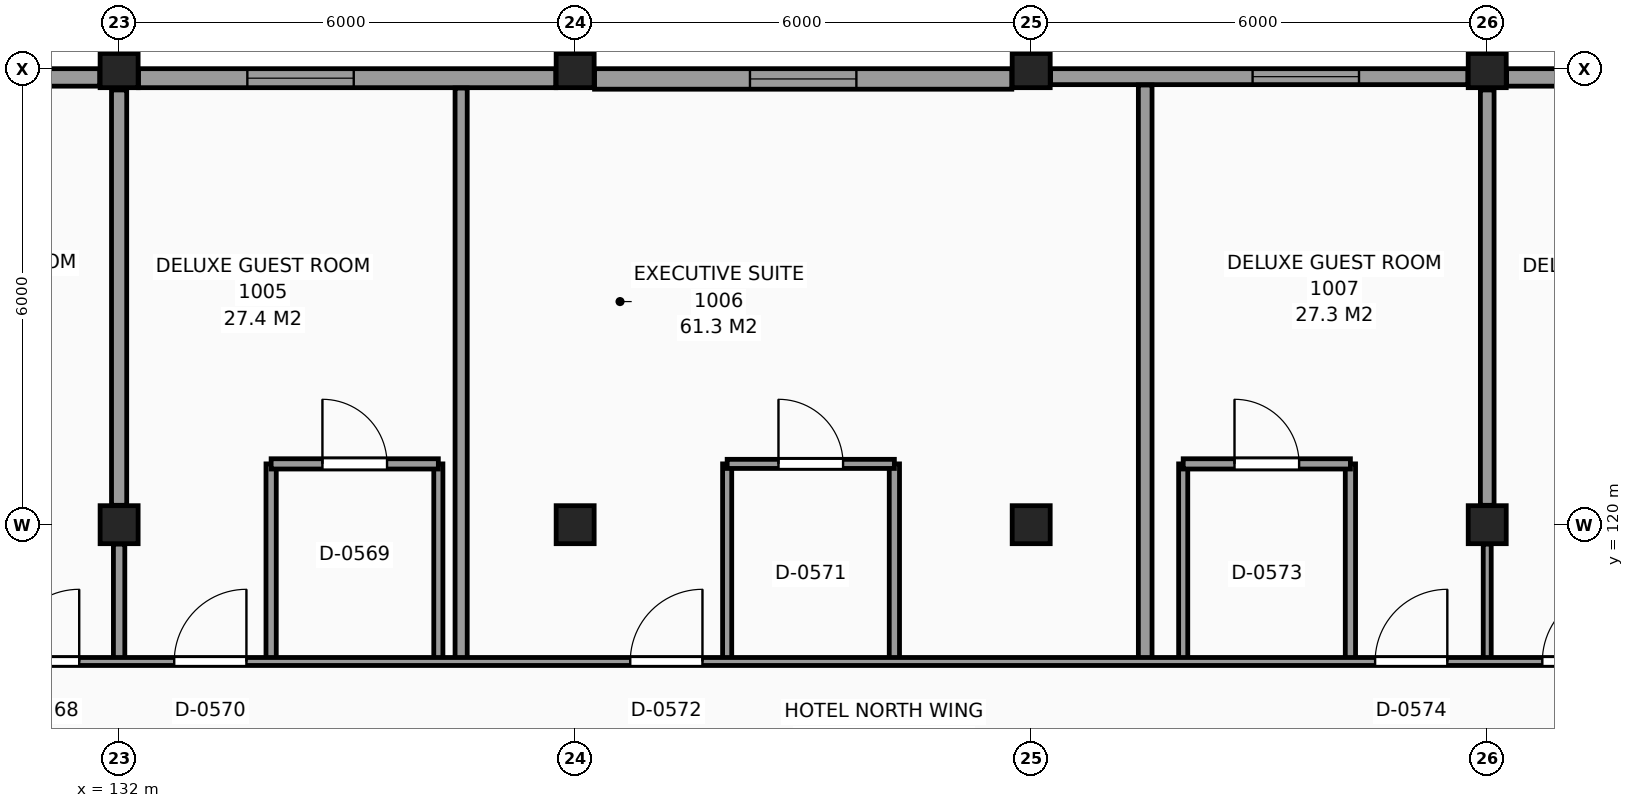
"""IFC4 building model, lengths in metres.
Left out: names, types, materials, properties, quantities, classifications, styles, units other than length and angle.
Written with IfcOpenShell. Run it as: python <this file> out.ifc"""

import sys

from ifc_helpers import new_model, si_unit, direction, frame, frame_2d, origin, origin_2d, place, context, subcontext, project, spatial, rectangle, extrude, element, fill, save


model = new_model("IFC4")
c1 = context("Model", 3, precision=1e-05, world=origin(), true_north=direction((0.0, 1.0)))
c2 = subcontext(c1, "Body", "Model", "MODEL_VIEW")
j1 = project(units=[si_unit("LENGTHUNIT", "METRE"), si_unit("PLANEANGLEUNIT", "RADIAN")], contexts=[c1])
p1 = place(None, origin())
s1 = spatial("IfcSite", under=j1, at=p1, CompositionType="ELEMENT")
p2 = place(p1, origin())
s2 = spatial("IfcBuilding", under=s1, at=p2, CompositionType="ELEMENT")
p3 = place(p2, frame((0.0, 0.0, 41.4)))
s3 = spatial("IfcBuildingStorey", under=s2, at=p3, CompositionType="ELEMENT", Elevation=41.4)
for number, where, z_axis, x_axis in (
    (1, (132.0, 120.0, 0.0), (0.0, 0.0, 1.0), (1.0, 0.0, 0.0)),
    (2, (132.0, 126.0, 0.0), (0.0, 0.0, 1.0), (1.0, 0.0, 0.0)),
    (3, (138.0, 120.0, 0.0), (0.0, 0.0, 1.0), (1.0, 0.0, 0.0)),
    (4, (138.0, 126.0, 0.0), (0.0, 0.0, 1.0), (1.0, 0.0, 0.0)),
    (5, (144.0, 120.0, 0.0), (0.0, 0.0, 1.0), (1.0, 0.0, 0.0)),
    (6, (144.0, 126.0, 0.0), (0.0, 0.0, 1.0), (1.0, 0.0, 0.0)),
    (7, (150.0, 120.0, 0.0), (0.0, 0.0, 1.0), (1.0, 0.0, 0.0)),
    (8, (150.0, 126.0, 0.0), (0.0, 0.0, 1.0), (1.0, 0.0, 0.0)),
):
    element("IfcColumn", number, at=place(p3, frame(where, z_axis=z_axis, x_axis=x_axis)), inside=s3, PredefinedType="COLUMN", context=c2, shape_type="SweptSolid", body=[
        extrude(rectangle(XDim=0.5, YDim=0.5, at=origin_2d()), origin(), (0.0, 0.0, 1.0), 3.3),
    ])
p4 = place(p3, frame((155.745, 125.885, 0.0), z_axis=(0.0, 0.0, 1.0), x_axis=(-1.0, 0.0, 0.0)))
e9 = element("IfcWall", 9, at=p4, inside=s3, PredefinedType="SOLIDWALL", context=c2, shape_type="SweptSolid", body=[
    extrude(rectangle(XDim=5.49, YDim=0.23, at=frame_2d((2.745, 0.0))), origin(), (0.0, 0.0, 1.0), 2.41),
])
p5 = place(p4, frame((2.658, 0.0, 0.8)))
e10 = element("IfcOpeningElement", 10, at=p5, cuts=e9, PredefinedType="OPENING", context=c2, shape_type="SweptSolid", body=[
    extrude(rectangle(XDim=1.4, YDim=1.4, at=frame_2d((0.7, 0.7))), frame((0.0, 0.125, 0.0), z_axis=(0.0, -1.0, 0.0), x_axis=(1.0, 0.0, 0.0)), (0.0, 0.0, 1.0), 0.25),
])
p6 = place(p3, frame((149.745, 125.895, 0.0), z_axis=(0.0, 0.0, 1.0), x_axis=(-1.0, 0.0, 0.0)))
e11 = element("IfcWall", 11, at=p6, inside=s3, PredefinedType="SOLIDWALL", context=c2, shape_type="SweptSolid", body=[
    extrude(rectangle(XDim=5.49, YDim=0.21, at=frame_2d((2.745, 0.0))), origin(), (0.0, 0.0, 1.0), 2.41),
])
p7 = place(p6, frame((1.432, 0.0, 0.8)))
e12 = element("IfcOpeningElement", 12, at=p7, cuts=e11, PredefinedType="OPENING", context=c2, shape_type="SweptSolid", body=[
    extrude(rectangle(XDim=1.4, YDim=1.4, at=frame_2d((0.7, 0.7))), frame((0.0, 0.115, 0.0), z_axis=(0.0, -1.0, 0.0), x_axis=(1.0, 0.0, 0.0)), (0.0, 0.0, 1.0), 0.23),
])
p8 = place(p3, frame((143.745, 125.865, 0.0), z_axis=(0.0, 0.0, 1.0), x_axis=(-1.0, 0.0, 0.0)))
e13 = element("IfcWall", 13, at=p8, inside=s3, PredefinedType="SOLIDWALL", context=c2, shape_type="SweptSolid", body=[
    extrude(rectangle(XDim=5.49, YDim=0.27, at=frame_2d((2.745, 0.0))), origin(), (0.0, 0.0, 1.0), 2.41),
])
p9 = place(p8, frame((2.045, 0.0, 0.8)))
e14 = element("IfcOpeningElement", 14, at=p9, cuts=e13, PredefinedType="OPENING", context=c2, shape_type="SweptSolid", body=[
    extrude(rectangle(XDim=1.4, YDim=1.4, at=frame_2d((0.7, 0.7))), frame((0.0, 0.145, 0.0), z_axis=(0.0, -1.0, 0.0), x_axis=(1.0, 0.0, 0.0)), (0.0, 0.0, 1.0), 0.29),
])
p10 = place(p3, frame((137.745, 125.875, 0.0), z_axis=(0.0, 0.0, 1.0), x_axis=(-1.0, 0.0, 0.0)))
e15 = element("IfcWall", 15, at=p10, inside=s3, PredefinedType="SOLIDWALL", context=c2, shape_type="SweptSolid", body=[
    extrude(rectangle(XDim=5.49, YDim=0.25, at=frame_2d((2.745, 0.0))), origin(), (0.0, 0.0, 1.0), 2.41),
])
p11 = place(p10, frame((2.658, 0.0, 0.8)))
e16 = element("IfcOpeningElement", 16, at=p11, cuts=e15, PredefinedType="OPENING", context=c2, shape_type="SweptSolid", body=[
    extrude(rectangle(XDim=1.4, YDim=1.4, at=frame_2d((0.7, 0.7))), frame((0.0, 0.135, 0.0), z_axis=(0.0, -1.0, 0.0), x_axis=(1.0, 0.0, 0.0)), (0.0, 0.0, 1.0), 0.27),
])
p12 = place(p3, frame((131.745, 125.885, 0.0), z_axis=(0.0, 0.0, 1.0), x_axis=(-1.0, 0.0, 0.0)))
e17 = element("IfcWall", 17, at=p12, inside=s3, PredefinedType="SOLIDWALL", context=c2, shape_type="SweptSolid", body=[
    extrude(rectangle(XDim=5.49, YDim=0.23, at=frame_2d((2.745, 0.0))), origin(), (0.0, 0.0, 1.0), 2.41),
])
p13 = place(p12, frame((1.432, 0.0, 0.8)))
e18 = element("IfcOpeningElement", 18, at=p13, cuts=e17, PredefinedType="OPENING", context=c2, shape_type="SweptSolid", body=[
    extrude(rectangle(XDim=1.4, YDim=1.4, at=frame_2d((0.7, 0.7))), frame((0.0, 0.125, 0.0), z_axis=(0.0, -1.0, 0.0), x_axis=(1.0, 0.0, 0.0)), (0.0, 0.0, 1.0), 0.25),
])
p14 = place(p3, frame((132.0, 118.2, 0.0), z_axis=(0.0, 0.0, 1.0), x_axis=(0.0, 1.0, 0.0)))
e19 = element("IfcWall", 19, at=p14, inside=s3, PredefinedType="PARTITIONING", context=c2, shape_type="SweptSolid", body=[
    extrude(rectangle(XDim=1.545, YDim=0.15, at=frame_2d((0.772, 0.0))), origin(), (0.0, 0.0, 1.0), 2.26),
])
p15 = place(p3, frame((132.0, 120.255, 0.0), z_axis=(0.0, 0.0, 1.0), x_axis=(0.0, 1.0, 0.0)))
e20 = element("IfcWall", 20, at=p15, inside=s3, PredefinedType="PARTITIONING", context=c2, shape_type="SweptSolid", body=[
    extrude(rectangle(XDim=5.465, YDim=0.2, at=frame_2d((2.732, 0.0))), origin(), (0.0, 0.0, 1.0), 2.26),
])
p16 = place(p3, frame((134.0, 118.2, 0.0), z_axis=(0.0, 0.0, 1.0), x_axis=(0.0, 1.0, 0.0)))
e21 = element("IfcWall", 21, at=p16, inside=s3, PredefinedType="PARTITIONING", context=c2, shape_type="SweptSolid", body=[
    extrude(rectangle(XDim=2.6, YDim=0.135, at=frame_2d((1.3, 0.0))), origin(), (0.0, 0.0, 1.0), 3.06),
])
p17 = place(p3, frame((136.2, 118.2, 0.0), z_axis=(0.0, 0.0, 1.0), x_axis=(0.0, 1.0, 0.0)))
e22 = element("IfcWall", 22, at=p17, inside=s3, PredefinedType="PARTITIONING", context=c2, shape_type="SweptSolid", body=[
    extrude(rectangle(XDim=2.6, YDim=0.12, at=frame_2d((1.3, 0.0))), origin(), (0.0, 0.0, 1.0), 3.06),
])
p18 = place(p3, frame((136.5, 118.2, 0.0), z_axis=(0.0, 0.0, 1.0), x_axis=(0.0, 1.0, 0.0)))
e23 = element("IfcWall", 23, at=p18, inside=s3, PredefinedType="PARTITIONING", context=c2, shape_type="SweptSolid", body=[
    extrude(rectangle(XDim=7.545, YDim=0.16, at=frame_2d((3.772, 0.0))), origin(), (0.0, 0.0, 1.0), 3.06),
])
p19 = place(p3, frame((140.0, 118.2, 0.0), z_axis=(0.0, 0.0, 1.0), x_axis=(0.0, 1.0, 0.0)))
e24 = element("IfcWall", 24, at=p19, inside=s3, PredefinedType="PARTITIONING", context=c2, shape_type="SweptSolid", body=[
    extrude(rectangle(XDim=2.6, YDim=0.12, at=frame_2d((1.3, 0.0))), origin(), (0.0, 0.0, 1.0), 3.06),
])
p20 = place(p3, frame((142.2, 118.2, 0.0), z_axis=(0.0, 0.0, 1.0), x_axis=(0.0, 1.0, 0.0)))
e25 = element("IfcWall", 25, at=p20, inside=s3, PredefinedType="PARTITIONING", context=c2, shape_type="SweptSolid", body=[
    extrude(rectangle(XDim=2.6, YDim=0.135, at=frame_2d((1.3, 0.0))), origin(), (0.0, 0.0, 1.0), 3.06),
])
p21 = place(p3, frame((145.5, 118.2, 0.0), z_axis=(0.0, 0.0, 1.0), x_axis=(0.0, 1.0, 0.0)))
e26 = element("IfcWall", 26, at=p21, inside=s3, PredefinedType="PARTITIONING", context=c2, shape_type="SweptSolid", body=[
    extrude(rectangle(XDim=7.585, YDim=0.18, at=frame_2d((3.792, 0.0))), origin(), (0.0, 0.0, 1.0), 3.06),
])
p22 = place(p3, frame((146.0, 118.2, 0.0), z_axis=(0.0, 0.0, 1.0), x_axis=(0.0, 1.0, 0.0)))
e27 = element("IfcWall", 27, at=p22, inside=s3, PredefinedType="PARTITIONING", context=c2, shape_type="SweptSolid", body=[
    extrude(rectangle(XDim=2.6, YDim=0.12, at=frame_2d((1.3, 0.0))), origin(), (0.0, 0.0, 1.0), 3.06),
])
p23 = place(p3, frame((148.2, 118.2, 0.0), z_axis=(0.0, 0.0, 1.0), x_axis=(0.0, 1.0, 0.0)))
e28 = element("IfcWall", 28, at=p23, inside=s3, PredefinedType="PARTITIONING", context=c2, shape_type="SweptSolid", body=[
    extrude(rectangle(XDim=2.6, YDim=0.135, at=frame_2d((1.3, 0.0))), origin(), (0.0, 0.0, 1.0), 3.06),
])
p24 = place(p3, frame((150.0, 118.2, 0.0), z_axis=(0.0, 0.0, 1.0), x_axis=(0.0, 1.0, 0.0)))
e29 = element("IfcWall", 29, at=p24, inside=s3, PredefinedType="PARTITIONING", context=c2, shape_type="SweptSolid", body=[
    extrude(rectangle(XDim=1.545, YDim=0.105, at=frame_2d((0.772, 0.0))), origin(), (0.0, 0.0, 1.0), 2.26),
])
p25 = place(p3, frame((150.0, 120.255, 0.0), z_axis=(0.0, 0.0, 1.0), x_axis=(0.0, 1.0, 0.0)))
e30 = element("IfcWall", 30, at=p25, inside=s3, PredefinedType="PARTITIONING", context=c2, shape_type="SweptSolid", body=[
    extrude(rectangle(XDim=5.465, YDim=0.18, at=frame_2d((2.732, 0.0))), origin(), (0.0, 0.0, 1.0), 2.36),
])
p26 = place(p3, frame((102.275, 118.2, 0.0), z_axis=(0.0, 0.0, 1.0), x_axis=(1.0, 0.0, 0.0)))
e31 = element("IfcWall", 31, at=p26, inside=s3, PredefinedType="PARTITIONING", context=c2, shape_type="SweptSolid", body=[
    extrude(rectangle(XDim=74.225, YDim=0.105, at=frame_2d((37.113, 0.0))), origin(), (0.0, 0.0, 1.0), 3.06),
])
p27 = place(p26, frame((7.55, 0.0, 0.0)))
e32 = element("IfcOpeningElement", 32, at=p27, cuts=e31, PredefinedType="OPENING", context=c2, shape_type="SweptSolid", body=[
    extrude(rectangle(XDim=0.95, YDim=2.1, at=frame_2d((0.475, 1.05))), frame((0.0, 0.062, 0.0), z_axis=(0.0, -1.0, 0.0), x_axis=(1.0, 0.0, 0.0)), (0.0, 0.0, 1.0), 0.125),
])
p28 = place(p26, frame((9.35, 0.0, 0.0)))
e33 = element("IfcOpeningElement", 33, at=p28, cuts=e31, PredefinedType="OPENING", context=c2, shape_type="SweptSolid", body=[
    extrude(rectangle(XDim=0.95, YDim=2.1, at=frame_2d((0.475, 1.05))), frame((0.0, 0.062, 0.0), z_axis=(0.0, -1.0, 0.0), x_axis=(1.0, 0.0, 0.0)), (0.0, 0.0, 1.0), 0.125),
])
p29 = place(p26, frame((24.05, 0.0, 0.0)))
e34 = element("IfcOpeningElement", 34, at=p29, cuts=e31, PredefinedType="OPENING", context=c2, shape_type="SweptSolid", body=[
    extrude(rectangle(XDim=0.95, YDim=2.1, at=frame_2d((0.475, 1.05))), frame((0.0, 0.062, 0.0), z_axis=(0.0, -1.0, 0.0), x_axis=(1.0, 0.0, 0.0)), (0.0, 0.0, 1.0), 0.125),
])
p30 = place(p26, frame((28.25, 0.0, 0.0)))
e35 = element("IfcOpeningElement", 35, at=p30, cuts=e31, PredefinedType="OPENING", context=c2, shape_type="SweptSolid", body=[
    extrude(rectangle(XDim=0.95, YDim=2.1, at=frame_2d((0.475, 1.05))), frame((0.0, 0.062, 0.0), z_axis=(0.0, -1.0, 0.0), x_axis=(1.0, 0.0, 0.0)), (0.0, 0.0, 1.0), 0.125),
])
p31 = place(p26, frame((30.45, 0.0, 0.0)))
e36 = element("IfcOpeningElement", 36, at=p31, cuts=e31, PredefinedType="OPENING", context=c2, shape_type="SweptSolid", body=[
    extrude(rectangle(XDim=0.95, YDim=2.1, at=frame_2d((0.475, 1.05))), frame((0.0, 0.062, 0.0), z_axis=(0.0, -1.0, 0.0), x_axis=(1.0, 0.0, 0.0)), (0.0, 0.0, 1.0), 0.125),
])
p32 = place(p26, frame((36.45, 0.0, 0.0)))
e37 = element("IfcOpeningElement", 37, at=p32, cuts=e31, PredefinedType="OPENING", context=c2, shape_type="SweptSolid", body=[
    extrude(rectangle(XDim=0.95, YDim=2.1, at=frame_2d((0.475, 1.05))), frame((0.0, 0.062, 0.0), z_axis=(0.0, -1.0, 0.0), x_axis=(1.0, 0.0, 0.0)), (0.0, 0.0, 1.0), 0.125),
])
p33 = place(p26, frame((46.25, 0.0, 0.0)))
e38 = element("IfcOpeningElement", 38, at=p33, cuts=e31, PredefinedType="OPENING", context=c2, shape_type="SweptSolid", body=[
    extrude(rectangle(XDim=0.95, YDim=2.1, at=frame_2d((0.475, 1.05))), frame((0.0, 0.062, 0.0), z_axis=(0.0, -1.0, 0.0), x_axis=(1.0, 0.0, 0.0)), (0.0, 0.0, 1.0), 0.125),
])
p34 = place(p26, frame((48.45, 0.0, 0.0)))
e39 = element("IfcOpeningElement", 39, at=p34, cuts=e31, PredefinedType="OPENING", context=c2, shape_type="SweptSolid", body=[
    extrude(rectangle(XDim=0.95, YDim=2.1, at=frame_2d((0.475, 1.05))), frame((0.0, 0.062, 0.0), z_axis=(0.0, -1.0, 0.0), x_axis=(1.0, 0.0, 0.0)), (0.0, 0.0, 1.0), 0.125),
])
p35 = place(p26, frame((62.3, 0.0, 0.0)))
e40 = element("IfcOpeningElement", 40, at=p35, cuts=e31, PredefinedType="OPENING", context=c2, shape_type="SweptSolid", body=[
    extrude(rectangle(XDim=0.95, YDim=2.1, at=frame_2d((0.475, 1.05))), frame((0.0, 0.062, 0.0), z_axis=(0.0, -1.0, 0.0), x_axis=(1.0, 0.0, 0.0)), (0.0, 0.0, 1.0), 0.125),
])
p36 = place(p26, frame((64.85, 0.0, 0.0)))
e41 = element("IfcOpeningElement", 41, at=p36, cuts=e31, PredefinedType="OPENING", context=c2, shape_type="SweptSolid", body=[
    extrude(rectangle(XDim=0.95, YDim=2.1, at=frame_2d((0.475, 1.05))), frame((0.0, 0.062, 0.0), z_axis=(0.0, -1.0, 0.0), x_axis=(1.0, 0.0, 0.0)), (0.0, 0.0, 1.0), 0.125),
])
p37 = place(p26, frame((68.95, 0.0, 0.0)))
e42 = element("IfcOpeningElement", 42, at=p37, cuts=e31, PredefinedType="OPENING", context=c2, shape_type="SweptSolid", body=[
    extrude(rectangle(XDim=0.95, YDim=2.1, at=frame_2d((0.475, 1.05))), frame((0.0, 0.062, 0.0), z_axis=(0.0, -1.0, 0.0), x_axis=(1.0, 0.0, 0.0)), (0.0, 0.0, 1.0), 0.125),
])
p38 = place(p3, frame((134.0, 120.8, 0.0), z_axis=(0.0, 0.0, 1.0), x_axis=(1.0, 0.0, 0.0)))
e43 = element("IfcWall", 43, at=p38, inside=s3, PredefinedType="PARTITIONING", context=c2, shape_type="SweptSolid", body=[
    extrude(rectangle(XDim=2.2, YDim=0.135, at=frame_2d((1.1, 0.0))), origin(), (0.0, 0.0, 1.0), 3.06),
])
p39 = place(p38, frame((0.675, 0.0, 0.0)))
e44 = element("IfcOpeningElement", 44, at=p39, cuts=e43, PredefinedType="OPENING", context=c2, shape_type="SweptSolid", body=[
    extrude(rectangle(XDim=0.85, YDim=2.1, at=frame_2d((0.425, 1.05))), frame((0.0, 0.078, 0.0), z_axis=(0.0, -1.0, 0.0), x_axis=(1.0, 0.0, 0.0)), (0.0, 0.0, 1.0), 0.155),
])
p40 = place(p3, frame((140.0, 120.8, 0.0), z_axis=(0.0, 0.0, 1.0), x_axis=(1.0, 0.0, 0.0)))
e45 = element("IfcWall", 45, at=p40, inside=s3, PredefinedType="PARTITIONING", context=c2, shape_type="SweptSolid", body=[
    extrude(rectangle(XDim=2.2, YDim=0.12, at=frame_2d((1.1, 0.0))), origin(), (0.0, 0.0, 1.0), 3.06),
])
p41 = place(p40, frame((0.675, 0.0, 0.0)))
e46 = element("IfcOpeningElement", 46, at=p41, cuts=e45, PredefinedType="OPENING", context=c2, shape_type="SweptSolid", body=[
    extrude(rectangle(XDim=0.85, YDim=2.1, at=frame_2d((0.425, 1.05))), frame((0.0, 0.07, 0.0), z_axis=(0.0, -1.0, 0.0), x_axis=(1.0, 0.0, 0.0)), (0.0, 0.0, 1.0), 0.14),
])
p42 = place(p3, frame((146.0, 120.8, 0.0), z_axis=(0.0, 0.0, 1.0), x_axis=(1.0, 0.0, 0.0)))
e47 = element("IfcWall", 47, at=p42, inside=s3, PredefinedType="PARTITIONING", context=c2, shape_type="SweptSolid", body=[
    extrude(rectangle(XDim=2.2, YDim=0.135, at=frame_2d((1.1, 0.0))), origin(), (0.0, 0.0, 1.0), 3.06),
])
p43 = place(p42, frame((0.675, 0.0, 0.0)))
e48 = element("IfcOpeningElement", 48, at=p43, cuts=e47, PredefinedType="OPENING", context=c2, shape_type="SweptSolid", body=[
    extrude(rectangle(XDim=0.85, YDim=2.1, at=frame_2d((0.425, 1.05))), frame((0.0, 0.078, 0.0), z_axis=(0.0, -1.0, 0.0), x_axis=(1.0, 0.0, 0.0)), (0.0, 0.0, 1.0), 0.155),
])
p44 = place(p11, origin())
e49 = element("IfcWindow", 49, at=p44, inside=s3, PartitioningType="SINGLE_PANEL", PredefinedType="WINDOW", context=c2, shape_type="SweptSolid", body=[
    extrude(rectangle(XDim=1.4, YDim=1.4, at=frame_2d((0.7, 0.7))), frame((0.0, 0.03, 0.0), z_axis=(0.0, -1.0, 0.0), x_axis=(1.0, 0.0, 0.0)), (0.0, 0.0, 1.0), 0.06),
])
fill(e16, e49)
p45 = place(p9, origin())
e50 = element("IfcWindow", 50, at=p45, inside=s3, PartitioningType="SINGLE_PANEL", PredefinedType="WINDOW", context=c2, shape_type="SweptSolid", body=[
    extrude(rectangle(XDim=1.4, YDim=1.4, at=frame_2d((0.7, 0.7))), frame((0.0, 0.03, 0.0), z_axis=(0.0, -1.0, 0.0), x_axis=(1.0, 0.0, 0.0)), (0.0, 0.0, 1.0), 0.06),
])
fill(e14, e50)
p46 = place(p7, origin())
e51 = element("IfcWindow", 51, at=p46, inside=s3, PartitioningType="SINGLE_PANEL", PredefinedType="WINDOW", context=c2, shape_type="SweptSolid", body=[
    extrude(rectangle(XDim=1.4, YDim=1.4, at=frame_2d((0.7, 0.7))), frame((0.0, 0.03, 0.0), z_axis=(0.0, -1.0, 0.0), x_axis=(1.0, 0.0, 0.0)), (0.0, 0.0, 1.0), 0.06),
])
fill(e12, e51)
p47 = place(p30, origin())
e52 = element("IfcDoor", 52, at=p47, inside=s3, OperationType="SINGLE_SWING_RIGHT", PredefinedType="DOOR", context=c2, shape_type="SweptSolid", body=[
    extrude(rectangle(XDim=0.95, YDim=2.1, at=frame_2d((0.475, 1.05))), frame((0.0, 0.025, 0.0), z_axis=(0.0, -1.0, 0.0), x_axis=(1.0, 0.0, 0.0)), (0.0, 0.0, 1.0), 0.05),
])
fill(e35, e52)
p48 = place(p39, origin())
e53 = element("IfcDoor", 53, at=p48, inside=s3, OperationType="SINGLE_SWING_LEFT", PredefinedType="DOOR", context=c2, shape_type="SweptSolid", body=[
    extrude(rectangle(XDim=0.85, YDim=2.1, at=frame_2d((0.425, 1.05))), frame((0.0, 0.025, 0.0), z_axis=(0.0, -1.0, 0.0), x_axis=(1.0, 0.0, 0.0)), (0.0, 0.0, 1.0), 0.05),
])
fill(e44, e53)
p49 = place(p31, origin())
e54 = element("IfcDoor", 54, at=p49, inside=s3, OperationType="SINGLE_SWING_RIGHT", PredefinedType="DOOR", context=c2, shape_type="SweptSolid", body=[
    extrude(rectangle(XDim=0.95, YDim=2.1, at=frame_2d((0.475, 1.05))), frame((0.0, 0.025, 0.0), z_axis=(0.0, -1.0, 0.0), x_axis=(1.0, 0.0, 0.0)), (0.0, 0.0, 1.0), 0.05),
])
fill(e36, e54)
p50 = place(p41, origin())
e55 = element("IfcDoor", 55, at=p50, inside=s3, OperationType="SINGLE_SWING_LEFT", PredefinedType="DOOR", context=c2, shape_type="SweptSolid", body=[
    extrude(rectangle(XDim=0.85, YDim=2.1, at=frame_2d((0.425, 1.05))), frame((0.0, 0.025, 0.0), z_axis=(0.0, -1.0, 0.0), x_axis=(1.0, 0.0, 0.0)), (0.0, 0.0, 1.0), 0.05),
])
fill(e46, e55)
p51 = place(p32, origin())
e56 = element("IfcDoor", 56, at=p51, inside=s3, OperationType="SINGLE_SWING_RIGHT", PredefinedType="DOOR", context=c2, shape_type="SweptSolid", body=[
    extrude(rectangle(XDim=0.95, YDim=2.1, at=frame_2d((0.475, 1.05))), frame((0.0, 0.025, 0.0), z_axis=(0.0, -1.0, 0.0), x_axis=(1.0, 0.0, 0.0)), (0.0, 0.0, 1.0), 0.05),
])
fill(e37, e56)
p52 = place(p43, origin())
e57 = element("IfcDoor", 57, at=p52, inside=s3, OperationType="SINGLE_SWING_LEFT", PredefinedType="DOOR", context=c2, shape_type="SweptSolid", body=[
    extrude(rectangle(XDim=0.85, YDim=2.1, at=frame_2d((0.425, 1.05))), frame((0.0, 0.025, 0.0), z_axis=(0.0, -1.0, 0.0), x_axis=(1.0, 0.0, 0.0)), (0.0, 0.0, 1.0), 0.05),
])
fill(e48, e57)
p53 = place(p33, origin())
e58 = element("IfcDoor", 58, at=p53, inside=s3, OperationType="SINGLE_SWING_RIGHT", PredefinedType="DOOR", context=c2, shape_type="SweptSolid", body=[
    extrude(rectangle(XDim=0.95, YDim=2.1, at=frame_2d((0.475, 1.05))), frame((0.0, 0.025, 0.0), z_axis=(0.0, -1.0, 0.0), x_axis=(1.0, 0.0, 0.0)), (0.0, 0.0, 1.0), 0.05),
])
fill(e38, e58)
p54 = place(p34, origin())
e59 = element("IfcDoor", 59, at=p54, inside=s3, OperationType="SINGLE_SWING_RIGHT", PredefinedType="DOOR", context=c2, shape_type="SweptSolid", body=[
    extrude(rectangle(XDim=0.95, YDim=2.1, at=frame_2d((0.475, 1.05))), frame((0.0, 0.025, 0.0), z_axis=(0.0, -1.0, 0.0), x_axis=(1.0, 0.0, 0.0)), (0.0, 0.0, 1.0), 0.05),
])
fill(e39, e59)
save(model, sys.argv[1])
